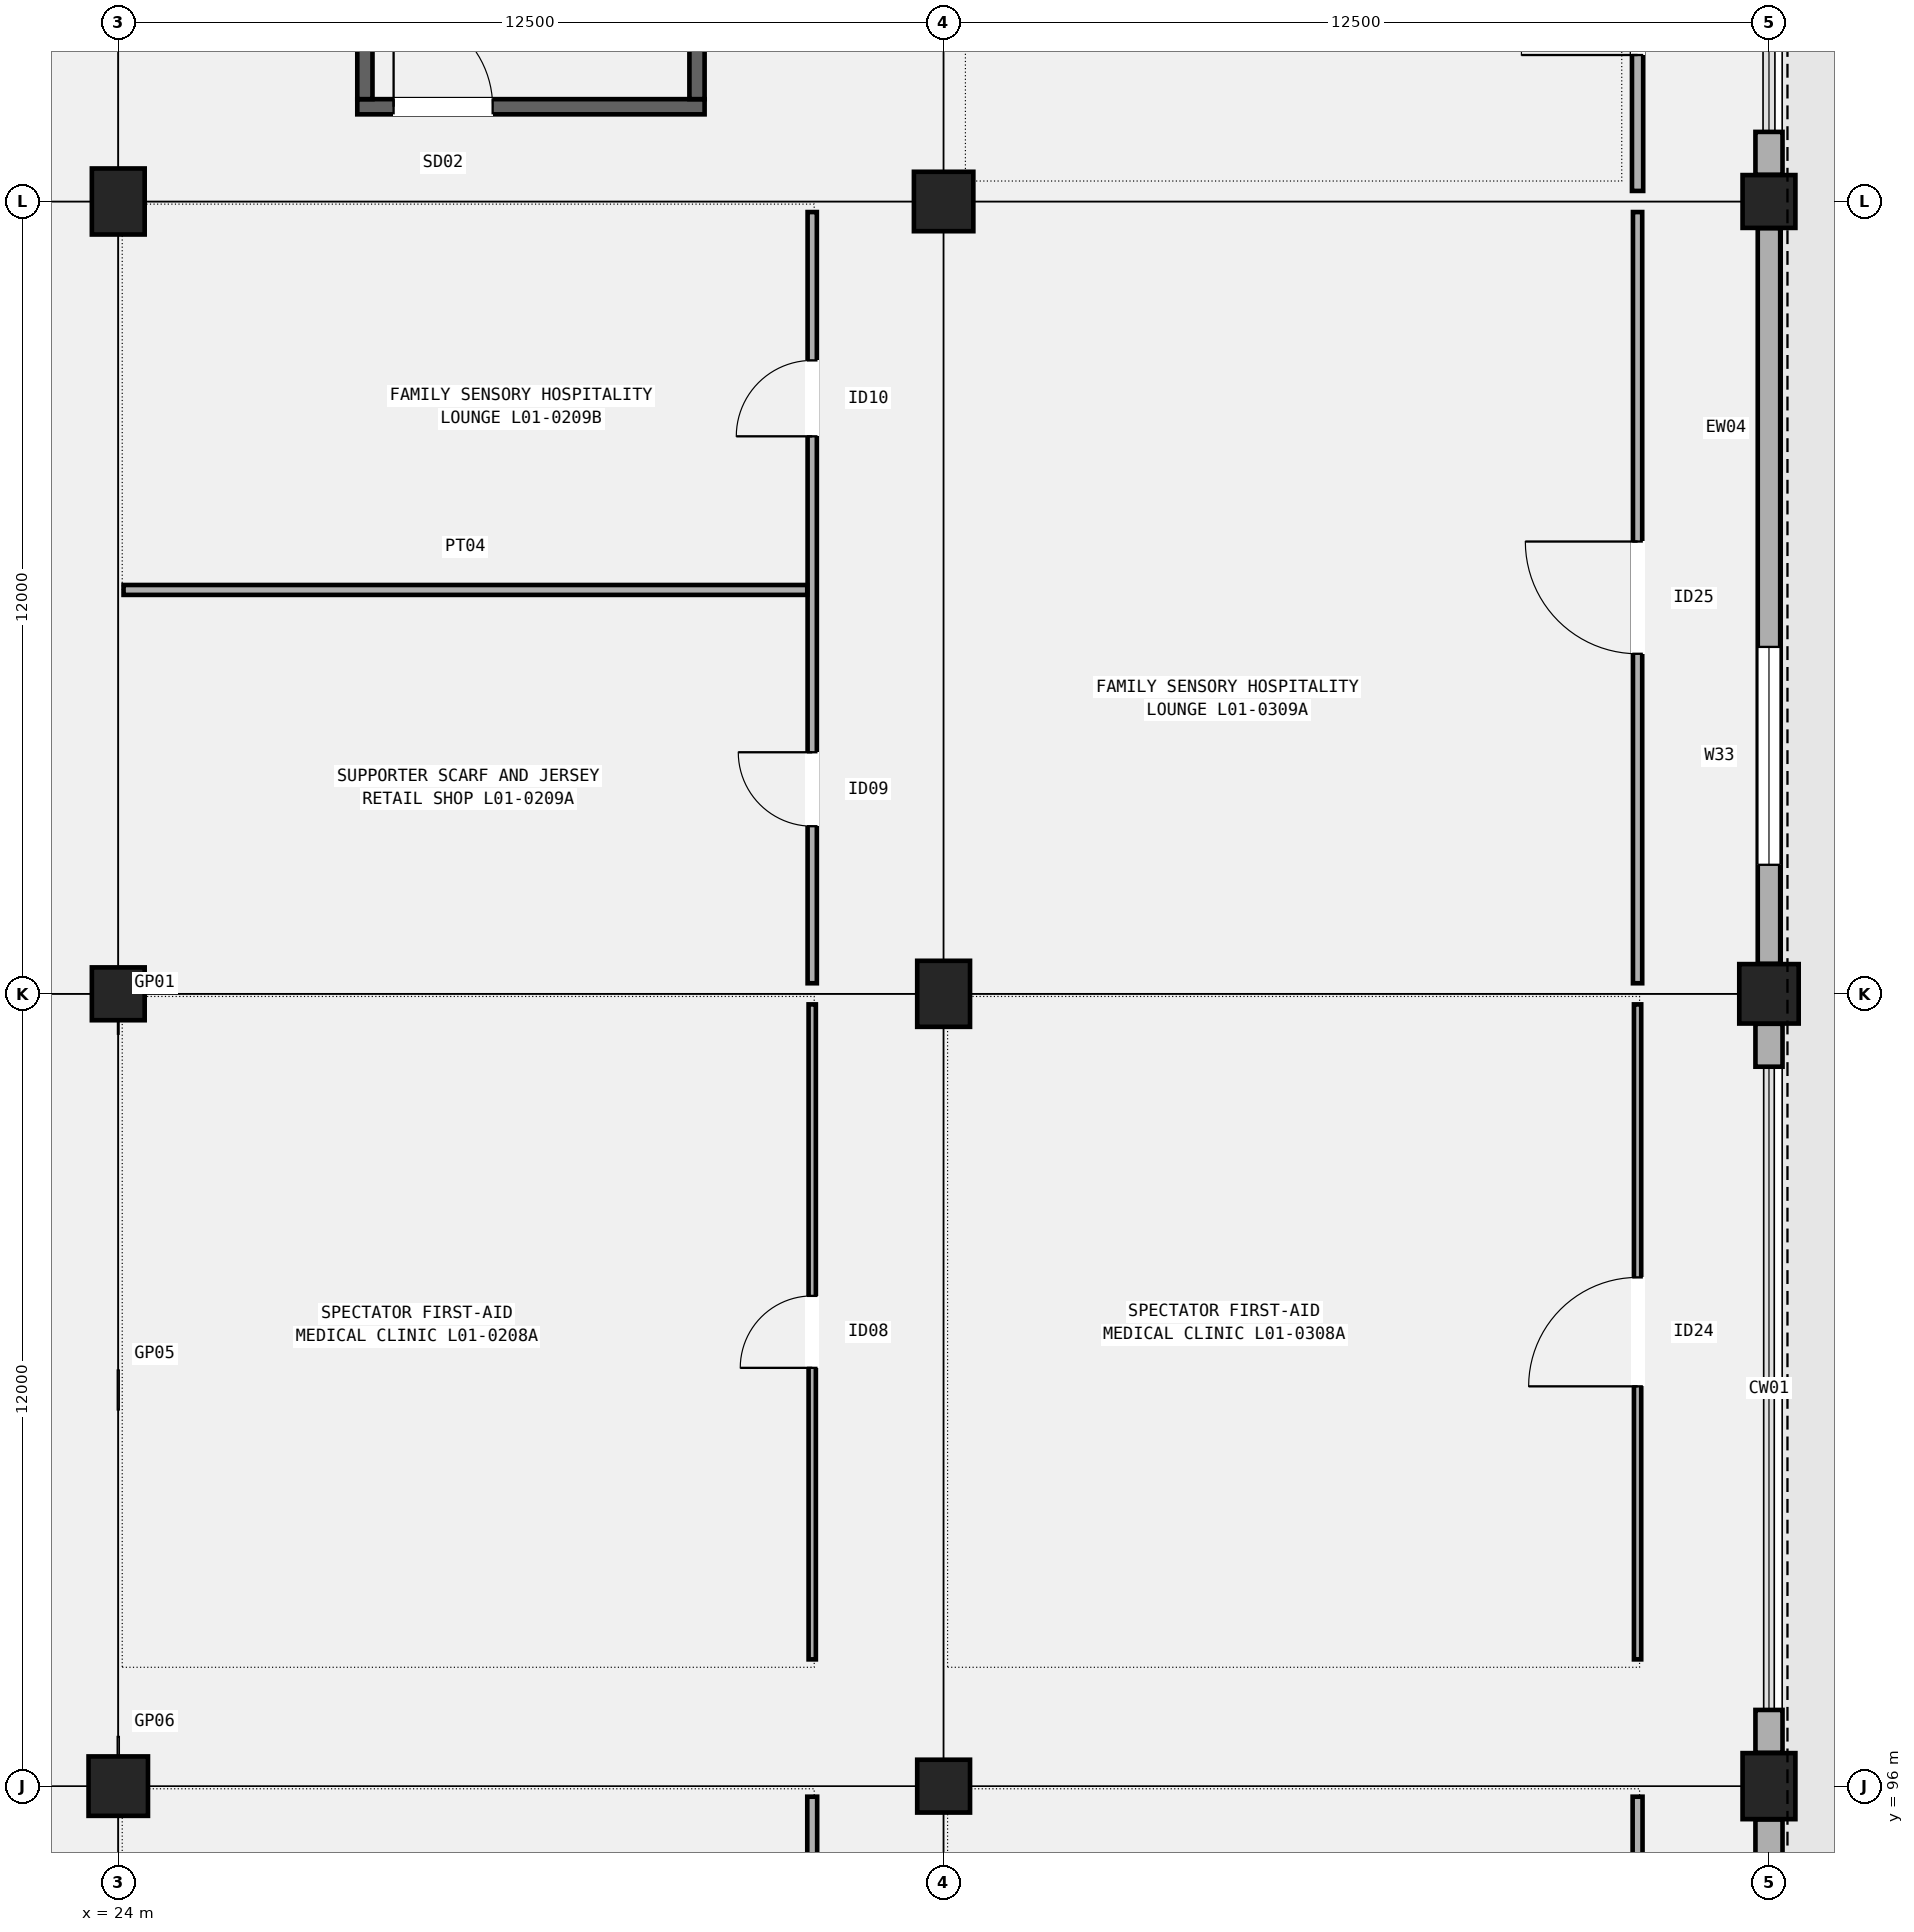
"""IFC4 building model, lengths in metres.
Left out: names, types, materials, properties, quantities, classifications, styles, units other than length and angle.
Written with IfcOpenShell. Run it as: python <this file> out.ifc"""

import sys

from ifc_helpers import new_model, si_unit, direction, frame, frame_2d, origin, origin_2d, place, context, subcontext, project, spatial, rectangle, extrude, element, fill, save


model = new_model("IFC4")
c1 = context("Model", 3, precision=1e-05, world=origin(), true_north=direction((0.0, 1.0)))
c2 = subcontext(c1, "Body", "Model", "MODEL_VIEW")
j1 = project(units=[si_unit("LENGTHUNIT", "METRE"), si_unit("PLANEANGLEUNIT", "RADIAN")], contexts=[c1])
p1 = place(None, origin())
s1 = spatial("IfcSite", under=j1, at=p1, CompositionType="ELEMENT")
p2 = place(p1, origin())
s2 = spatial("IfcBuilding", under=s1, at=p2, CompositionType="ELEMENT")
p3 = place(p2, frame((0.0, 0.0, 5.4)))
s3 = spatial("IfcBuildingStorey", under=s2, at=p3, CompositionType="ELEMENT", Elevation=5.4)
p4 = place(p3, frame((24.0, 96.0, 0.0), z_axis=(0.0, 0.0, 1.0), x_axis=(1.0, 0.0, 0.0)))
e1 = element("IfcColumn", 1, at=p4, inside=s3, PredefinedType="COLUMN", context=c2, shape_type="SweptSolid", body=[
    extrude(rectangle(XDim=0.9, YDim=0.9, at=origin_2d()), origin(), (0.0, 0.0, 1.0), 4.8),
])
p5 = place(p3, frame((24.0, 108.0, 0.0), z_axis=(0.0, 0.0, 1.0), x_axis=(1.0, 0.0, 0.0)))
e2 = element("IfcColumn", 2, at=p5, inside=s3, PredefinedType="COLUMN", context=c2, shape_type="SweptSolid", body=[
    extrude(rectangle(XDim=0.8, YDim=0.8, at=origin_2d()), origin(), (0.0, 0.0, 1.0), 4.8),
])
p6 = place(p3, frame((24.0, 120.0, 0.0), z_axis=(0.0, 0.0, 1.0), x_axis=(1.0, 0.0, 0.0)))
e3 = element("IfcColumn", 3, at=p6, inside=s3, PredefinedType="COLUMN", context=c2, shape_type="SweptSolid", body=[
    extrude(rectangle(XDim=0.8, YDim=1.0, at=origin_2d()), origin(), (0.0, 0.0, 1.0), 4.8),
])
p7 = place(p3, frame((36.5, 96.0, 0.0), z_axis=(0.0, 0.0, 1.0), x_axis=(1.0, 0.0, 0.0)))
e4 = element("IfcColumn", 4, at=p7, inside=s3, PredefinedType="COLUMN", context=c2, shape_type="SweptSolid", body=[
    extrude(rectangle(XDim=0.8, YDim=0.8, at=origin_2d()), origin(), (0.0, 0.0, 1.0), 4.8),
])
p8 = place(p3, frame((36.5, 108.0, 0.0), z_axis=(0.0, 0.0, 1.0), x_axis=(1.0, 0.0, 0.0)))
e5 = element("IfcColumn", 5, at=p8, inside=s3, PredefinedType="COLUMN", context=c2, shape_type="SweptSolid", body=[
    extrude(rectangle(XDim=0.8, YDim=1.0, at=origin_2d()), origin(), (0.0, 0.0, 1.0), 4.8),
])
p9 = place(p3, frame((36.5, 120.0, 0.0), z_axis=(0.0, 0.0, 1.0), x_axis=(1.0, 0.0, 0.0)))
e6 = element("IfcColumn", 6, at=p9, inside=s3, PredefinedType="COLUMN", context=c2, shape_type="SweptSolid", body=[
    extrude(rectangle(XDim=0.9, YDim=0.9, at=origin_2d()), origin(), (0.0, 0.0, 1.0), 4.8),
])
p10 = place(p3, frame((49.0, 96.0, 0.0), z_axis=(0.0, 0.0, 1.0), x_axis=(1.0, 0.0, 0.0)))
e7 = element("IfcColumn", 7, at=p10, inside=s3, PredefinedType="COLUMN", context=c2, shape_type="SweptSolid", body=[
    extrude(rectangle(XDim=0.8, YDim=1.0, at=origin_2d()), origin(), (0.0, 0.0, 1.0), 4.8),
])
p11 = place(p3, frame((49.0, 108.0, 0.0), z_axis=(0.0, 0.0, 1.0), x_axis=(1.0, 0.0, 0.0)))
e8 = element("IfcColumn", 8, at=p11, inside=s3, PredefinedType="COLUMN", context=c2, shape_type="SweptSolid", body=[
    extrude(rectangle(XDim=0.9, YDim=0.9, at=origin_2d()), origin(), (0.0, 0.0, 1.0), 4.8),
])
p12 = place(p3, frame((49.0, 120.0, 0.0), z_axis=(0.0, 0.0, 1.0), x_axis=(1.0, 0.0, 0.0)))
e9 = element("IfcColumn", 9, at=p12, inside=s3, PredefinedType="COLUMN", context=c2, shape_type="SweptSolid", body=[
    extrude(rectangle(XDim=0.8, YDim=0.8, at=origin_2d()), origin(), (0.0, 0.0, 1.0), 4.8),
])
p13 = place(p3, frame((49.0, 84.404, 0.0), z_axis=(0.0, 0.0, 1.0), x_axis=(0.0, 1.0, 0.0)))
e10 = element("IfcWall", 10, at=p13, inside=s3, PredefinedType="SOLIDWALL", context=c2, shape_type="SweptSolid", body=[
    extrude(rectangle(XDim=11.092, YDim=0.41, at=frame_2d((5.546, 0.0))), origin(), (0.0, 0.0, 1.0), 4.2),
])
p14 = place(p13, frame((1.5, 0.0, 0.95)))
e11 = element("IfcOpeningElement", 11, at=p14, cuts=e10, PredefinedType="OPENING", context=c2, shape_type="SweptSolid", body=[
    extrude(rectangle(XDim=3.15, YDim=1.9, at=frame_2d((1.575, 0.95))), frame((0.0, 0.215, 0.0), z_axis=(0.0, -1.0, 0.0), x_axis=(1.0, 0.0, 0.0)), (0.0, 0.0, 1.0), 0.43),
])
p15 = place(p3, frame((49.0, 96.504, 0.0), z_axis=(0.0, 0.0, 1.0), x_axis=(0.0, 1.0, 0.0)))
e12 = element("IfcWall", 12, at=p15, inside=s3, PredefinedType="SOLIDWALL", context=c2, shape_type="SweptSolid", body=[
    extrude(rectangle(XDim=0.65, YDim=0.41, at=frame_2d((0.325, 0.0))), origin(), (0.0, 0.0, 1.0), 4.15),
])
p16 = place(p3, frame((49.0, 106.896, 0.0), z_axis=(0.0, 0.0, 1.0), x_axis=(0.0, 1.0, 0.0)))
e13 = element("IfcWall", 13, at=p16, inside=s3, PredefinedType="SOLIDWALL", context=c2, shape_type="SweptSolid", body=[
    extrude(rectangle(XDim=0.65, YDim=0.41, at=frame_2d((0.325, 0.0))), origin(), (0.0, 0.0, 1.0), 4.15),
])
p17 = place(p3, frame((49.0, 108.454, 0.0), z_axis=(0.0, 0.0, 1.0), x_axis=(0.0, 1.0, 0.0)))
e14 = element("IfcWall", 14, at=p17, inside=s3, PredefinedType="SOLIDWALL", context=c2, shape_type="SweptSolid", body=[
    extrude(rectangle(XDim=11.142, YDim=0.34, at=frame_2d((5.571, 0.0))), origin(), (0.0, 0.0, 1.0), 4.2),
])
p18 = place(p17, frame((1.5, 0.0, 0.95)))
e15 = element("IfcOpeningElement", 15, at=p18, cuts=e14, PredefinedType="OPENING", context=c2, shape_type="SweptSolid", body=[
    extrude(rectangle(XDim=3.3, YDim=1.8, at=frame_2d((1.65, 0.9))), frame((0.0, 0.18, 0.0), z_axis=(0.0, -1.0, 0.0), x_axis=(1.0, 0.0, 0.0)), (0.0, 0.0, 1.0), 0.36),
])
p19 = place(p3, frame((49.0, 120.404, 0.0), z_axis=(0.0, 0.0, 1.0), x_axis=(0.0, 1.0, 0.0)))
e16 = element("IfcWall", 16, at=p19, inside=s3, PredefinedType="SOLIDWALL", context=c2, shape_type="SweptSolid", body=[
    extrude(rectangle(XDim=0.65, YDim=0.41, at=frame_2d((0.325, 0.0))), origin(), (0.0, 0.0, 1.0), 4.15),
])
p20 = place(p3, frame((27.62, 121.435, 0.0), z_axis=(0.0, 0.0, 1.0), x_axis=(1.0, 0.0, 0.0)))
e17 = element("IfcWall", 17, at=p20, inside=s3, PredefinedType="SHEAR", context=c2, shape_type="SweptSolid", body=[
    extrude(rectangle(XDim=5.26, YDim=0.23, at=frame_2d((2.63, 0.0))), origin(), (0.0, 0.0, 1.0), 4.55),
])
p21 = place(p20, frame((0.55, 0.0, 0.0)))
e18 = element("IfcOpeningElement", 18, at=p21, cuts=e17, PredefinedType="OPENING", context=c2, shape_type="SweptSolid", body=[
    extrude(rectangle(XDim=1.5, YDim=2.2, at=frame_2d((0.75, 1.1))), frame((0.0, 0.125, 0.0), z_axis=(0.0, -1.0, 0.0), x_axis=(1.0, 0.0, 0.0)), (0.0, 0.0, 1.0), 0.25),
])
for number, where, z_axis, x_axis in (
    (19, (27.735, 121.55, 0.0), (0.0, 0.0, 1.0), (0.0, 1.0, 0.0)),
    (20, (32.765, 121.55, 0.0), (0.0, 0.0, 1.0), (0.0, 1.0, 0.0)),
):
    element("IfcWall", number, at=place(p3, frame(where, z_axis=z_axis, x_axis=x_axis)), inside=s3, PredefinedType="SHEAR", context=c2, shape_type="SweptSolid", body=[
        extrude(rectangle(XDim=8.9, YDim=0.23, at=frame_2d((4.45, 0.0))), origin(), (0.0, 0.0, 1.0), 4.55),
    ])
p22 = place(p3, frame((34.51, 84.16, 0.0), z_axis=(0.0, 0.0, 1.0), x_axis=(0.0, 1.0, 0.0)))
e21 = element("IfcWall", 21, at=p22, inside=s3, PredefinedType="PARTITIONING", context=c2, shape_type="SweptSolid", body=[
    extrude(rectangle(XDim=11.68, YDim=0.15, at=frame_2d((5.84, 0.0))), origin(), (0.0, 0.0, 1.0), 3.92),
])
p23 = place(p22, frame((5.31, 0.0, 0.0)))
e22 = element("IfcOpeningElement", 22, at=p23, cuts=e21, PredefinedType="OPENING", context=c2, shape_type="SweptSolid", body=[
    extrude(rectangle(XDim=1.06, YDim=2.15, at=frame_2d((0.53, 1.075))), frame((0.0, 0.085, 0.0), z_axis=(0.0, -1.0, 0.0), x_axis=(1.0, 0.0, 0.0)), (0.0, 0.0, 1.0), 0.17),
])
p24 = place(p3, frame((34.51, 97.92, 0.0), z_axis=(0.0, 0.0, 1.0), x_axis=(0.0, 1.0, 0.0)))
e23 = element("IfcWall", 23, at=p24, inside=s3, PredefinedType="PARTITIONING", context=c2, shape_type="SweptSolid", body=[
    extrude(rectangle(XDim=9.92, YDim=0.11, at=frame_2d((4.96, 0.0))), origin(), (0.0, 0.0, 1.0), 3.92),
])
p25 = place(p24, frame((4.415, 0.0, 0.0)))
e24 = element("IfcOpeningElement", 24, at=p25, cuts=e23, PredefinedType="OPENING", context=c2, shape_type="SweptSolid", body=[
    extrude(rectangle(XDim=1.09, YDim=2.16, at=frame_2d((0.545, 1.08))), frame((0.0, 0.065, 0.0), z_axis=(0.0, -1.0, 0.0), x_axis=(1.0, 0.0, 0.0)), (0.0, 0.0, 1.0), 0.13),
])
p26 = place(p3, frame((34.51, 108.16, 0.0), z_axis=(0.0, 0.0, 1.0), x_axis=(0.0, 1.0, 0.0)))
e25 = element("IfcWall", 25, at=p26, inside=s3, PredefinedType="PARTITIONING", context=c2, shape_type="SweptSolid", body=[
    extrude(rectangle(XDim=11.68, YDim=0.14, at=frame_2d((5.84, 0.0))), origin(), (0.0, 0.0, 1.0), 3.92),
])
p27 = place(p26, frame((2.378, 0.0, 0.0)))
e26 = element("IfcOpeningElement", 26, at=p27, cuts=e25, PredefinedType="OPENING", context=c2, shape_type="SweptSolid", body=[
    extrude(rectangle(XDim=1.12, YDim=2.18, at=frame_2d((0.56, 1.09))), frame((0.0, 0.08, 0.0), z_axis=(0.0, -1.0, 0.0), x_axis=(1.0, 0.0, 0.0)), (0.0, 0.0, 1.0), 0.16),
])
p28 = place(p26, frame((8.283, 0.0, 0.0)))
e27 = element("IfcOpeningElement", 27, at=p28, cuts=e25, PredefinedType="OPENING", context=c2, shape_type="SweptSolid", body=[
    extrude(rectangle(XDim=1.15, YDim=2.15, at=frame_2d((0.575, 1.075))), frame((0.0, 0.08, 0.0), z_axis=(0.0, -1.0, 0.0), x_axis=(1.0, 0.0, 0.0)), (0.0, 0.0, 1.0), 0.16),
])
p29 = place(p3, frame((24.08, 114.117, 0.0), z_axis=(0.0, 0.0, 1.0), x_axis=(1.0, 0.0, 0.0)))
e28 = element("IfcWall", 28, at=p29, inside=s3, PredefinedType="PARTITIONING", context=c2, shape_type="SweptSolid", body=[
    extrude(rectangle(XDim=10.355, YDim=0.15, at=frame_2d((5.177, 0.0))), origin(), (0.0, 0.0, 1.0), 3.92),
])
p30 = place(p3, frame((47.01, 84.16, 0.0), z_axis=(0.0, 0.0, 1.0), x_axis=(0.0, 1.0, 0.0)))
e29 = element("IfcWall", 29, at=p30, inside=s3, PredefinedType="PARTITIONING", context=c2, shape_type="SweptSolid", body=[
    extrude(rectangle(XDim=11.68, YDim=0.15, at=frame_2d((5.84, 0.0))), origin(), (0.0, 0.0, 1.0), 3.92),
])
p31 = place(p30, frame((5.04, 0.0, 0.0)))
e30 = element("IfcOpeningElement", 30, at=p31, cuts=e29, PredefinedType="OPENING", context=c2, shape_type="SweptSolid", body=[
    extrude(rectangle(XDim=1.6, YDim=2.3, at=frame_2d((0.8, 1.15))), frame((0.0, 0.085, 0.0), z_axis=(0.0, -1.0, 0.0), x_axis=(1.0, 0.0, 0.0)), (0.0, 0.0, 1.0), 0.17),
])
p32 = place(p3, frame((47.01, 97.92, 0.0), z_axis=(0.0, 0.0, 1.0), x_axis=(0.0, 1.0, 0.0)))
e31 = element("IfcWall", 31, at=p32, inside=s3, PredefinedType="PARTITIONING", context=c2, shape_type="SweptSolid", body=[
    extrude(rectangle(XDim=9.92, YDim=0.11, at=frame_2d((4.96, 0.0))), origin(), (0.0, 0.0, 1.0), 3.92),
])
p33 = place(p32, frame((4.135, 0.0, 0.0)))
e32 = element("IfcOpeningElement", 32, at=p33, cuts=e31, PredefinedType="OPENING", context=c2, shape_type="SweptSolid", body=[
    extrude(rectangle(XDim=1.65, YDim=2.28, at=frame_2d((0.825, 1.14))), frame((0.0, 0.065, 0.0), z_axis=(0.0, -1.0, 0.0), x_axis=(1.0, 0.0, 0.0)), (0.0, 0.0, 1.0), 0.13),
])
p34 = place(p3, frame((47.01, 108.16, 0.0), z_axis=(0.0, 0.0, 1.0), x_axis=(0.0, 1.0, 0.0)))
e33 = element("IfcWall", 33, at=p34, inside=s3, PredefinedType="PARTITIONING", context=c2, shape_type="SweptSolid", body=[
    extrude(rectangle(XDim=11.68, YDim=0.14, at=frame_2d((5.84, 0.0))), origin(), (0.0, 0.0, 1.0), 3.92),
])
p35 = place(p34, frame((4.99, 0.0, 0.0)))
e34 = element("IfcOpeningElement", 34, at=p35, cuts=e33, PredefinedType="OPENING", context=c2, shape_type="SweptSolid", body=[
    extrude(rectangle(XDim=1.7, YDim=2.32, at=frame_2d((0.85, 1.16))), frame((0.0, 0.08, 0.0), z_axis=(0.0, -1.0, 0.0), x_axis=(1.0, 0.0, 0.0)), (0.0, 0.0, 1.0), 0.16),
])
p36 = place(p3, frame((47.01, 120.16, 0.0), z_axis=(0.0, 0.0, 1.0), x_axis=(0.0, 1.0, 0.0)))
e35 = element("IfcWall", 35, at=p36, inside=s3, PredefinedType="PARTITIONING", context=c2, shape_type="SweptSolid", body=[
    extrude(rectangle(XDim=11.68, YDim=0.17, at=frame_2d((5.84, 0.0))), origin(), (0.0, 0.0, 1.0), 3.92),
])
p37 = place(p36, frame((2.058, 0.0, 0.0)))
e36 = element("IfcOpeningElement", 36, at=p37, cuts=e35, PredefinedType="OPENING", context=c2, shape_type="SweptSolid", body=[
    extrude(rectangle(XDim=1.76, YDim=2.3, at=frame_2d((0.88, 1.15))), frame((0.0, 0.095, 0.0), z_axis=(0.0, -1.0, 0.0), x_axis=(1.0, 0.0, 0.0)), (0.0, 0.0, 1.0), 0.19),
])
p38 = place(p36, frame((8.408, 0.0, 0.0)))
e37 = element("IfcOpeningElement", 37, at=p38, cuts=e35, PredefinedType="OPENING", context=c2, shape_type="SweptSolid", body=[
    extrude(rectangle(XDim=0.9, YDim=2.06, at=frame_2d((0.45, 1.03))), frame((0.0, 0.095, 0.0), z_axis=(0.0, -1.0, 0.0), x_axis=(1.0, 0.0, 0.0)), (0.0, 0.0, 1.0), 0.19),
])
p39 = place(p18, origin())
e38 = element("IfcWindow", 38, at=p39, inside=s3, PartitioningType="SINGLE_PANEL", PredefinedType="WINDOW", context=c2, shape_type="SweptSolid", body=[
    extrude(rectangle(XDim=3.3, YDim=1.8, at=frame_2d((1.65, 0.9))), frame((0.0, 0.03, 0.0), z_axis=(0.0, -1.0, 0.0), x_axis=(1.0, 0.0, 0.0)), (0.0, 0.0, 1.0), 0.06),
])
fill(e15, e38)
p40 = place(p21, origin())
e39 = element("IfcDoor", 39, at=p40, inside=s3, OperationType="SINGLE_SWING_LEFT", PredefinedType="DOOR", context=c2, shape_type="SweptSolid", body=[
    extrude(rectangle(XDim=1.5, YDim=2.2, at=frame_2d((0.75, 1.1))), frame((0.0, 0.025, 0.0), z_axis=(0.0, -1.0, 0.0), x_axis=(1.0, 0.0, 0.0)), (0.0, 0.0, 1.0), 0.05),
])
fill(e18, e39)
p41 = place(p25, origin())
e40 = element("IfcDoor", 40, at=p41, inside=s3, OperationType="SINGLE_SWING_LEFT", PredefinedType="DOOR", context=c2, shape_type="SweptSolid", body=[
    extrude(rectangle(XDim=1.09, YDim=2.16, at=frame_2d((0.545, 1.08))), frame((0.0, 0.025, 0.0), z_axis=(0.0, -1.0, 0.0), x_axis=(1.0, 0.0, 0.0)), (0.0, 0.0, 1.0), 0.05),
])
fill(e24, e40)
p42 = place(p27, origin())
e41 = element("IfcDoor", 41, at=p42, inside=s3, OperationType="SINGLE_SWING_RIGHT", PredefinedType="DOOR", context=c2, shape_type="SweptSolid", body=[
    extrude(rectangle(XDim=1.12, YDim=2.18, at=frame_2d((0.56, 1.09))), frame((0.0, 0.025, 0.0), z_axis=(0.0, -1.0, 0.0), x_axis=(1.0, 0.0, 0.0)), (0.0, 0.0, 1.0), 0.05),
])
fill(e26, e41)
p43 = place(p28, origin())
e42 = element("IfcDoor", 42, at=p43, inside=s3, OperationType="SINGLE_SWING_LEFT", PredefinedType="DOOR", context=c2, shape_type="SweptSolid", body=[
    extrude(rectangle(XDim=1.15, YDim=2.15, at=frame_2d((0.575, 1.075))), frame((0.0, 0.025, 0.0), z_axis=(0.0, -1.0, 0.0), x_axis=(1.0, 0.0, 0.0)), (0.0, 0.0, 1.0), 0.05),
])
fill(e27, e42)
p44 = place(p33, origin())
e43 = element("IfcDoor", 43, at=p44, inside=s3, OperationType="SINGLE_SWING_LEFT", PredefinedType="DOOR", context=c2, shape_type="SweptSolid", body=[
    extrude(rectangle(XDim=1.65, YDim=2.28, at=frame_2d((0.825, 1.14))), frame((0.0, 0.025, 0.0), z_axis=(0.0, -1.0, 0.0), x_axis=(1.0, 0.0, 0.0)), (0.0, 0.0, 1.0), 0.05),
])
fill(e32, e43)
p45 = place(p35, origin())
e44 = element("IfcDoor", 44, at=p45, inside=s3, OperationType="SINGLE_SWING_RIGHT", PredefinedType="DOOR", context=c2, shape_type="SweptSolid", body=[
    extrude(rectangle(XDim=1.7, YDim=2.32, at=frame_2d((0.85, 1.16))), frame((0.0, 0.025, 0.0), z_axis=(0.0, -1.0, 0.0), x_axis=(1.0, 0.0, 0.0)), (0.0, 0.0, 1.0), 0.05),
])
fill(e34, e44)
p46 = place(p37, origin())
e45 = element("IfcDoor", 45, at=p46, inside=s3, OperationType="SINGLE_SWING_LEFT", PredefinedType="DOOR", context=c2, shape_type="SweptSolid", body=[
    extrude(rectangle(XDim=1.76, YDim=2.3, at=frame_2d((0.88, 1.15))), frame((0.0, 0.025, 0.0), z_axis=(0.0, -1.0, 0.0), x_axis=(1.0, 0.0, 0.0)), (0.0, 0.0, 1.0), 0.05),
])
fill(e36, e45)
save(model, sys.argv[1])
